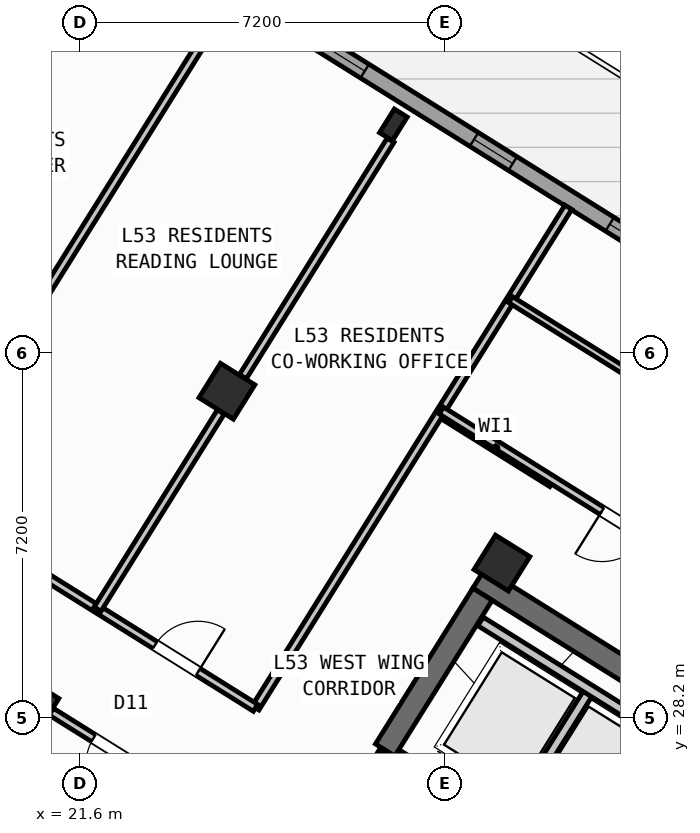
"""IFC4 building model, lengths in metres.
Left out: names, types, materials, properties, quantities, classifications, styles, units other than length and angle.
Written with IfcOpenShell. Run it as: python <this file> out.ifc"""

import sys

from ifc_helpers import new_model, si_unit, direction, frame, frame_2d, origin, origin_2d, place, context, subcontext, project, spatial, rectangle, hollow_rectangle, i_section, extrude, source, transform, mapped, element, fill, save


model = new_model("IFC4")
c1 = context("Model", 3, precision=1e-05, world=origin(), true_north=direction((0.0, 1.0)))
c2 = subcontext(c1, "Body", "Model", "MODEL_VIEW")
j1 = project(units=[si_unit("LENGTHUNIT", "METRE"), si_unit("PLANEANGLEUNIT", "RADIAN")], contexts=[c1])
p1 = place(None, origin())
s1 = spatial("IfcSite", under=j1, at=p1, CompositionType="ELEMENT")
p2 = place(p1, origin())
s2 = spatial("IfcBuilding", under=s1, at=p2, CompositionType="ELEMENT")
p3 = place(p2, frame((0.0, 0.0, 211.2)))
s3 = spatial("IfcBuildingStorey", under=s2, at=p3, CompositionType="ELEMENT", Elevation=211.2)
p4 = place(p3, frame((40.531, 24.036, 0.0), z_axis=(0.0, 0.0, 1.0), x_axis=(-0.848048787466, 0.529918157905, 0.0)))
e1 = element("IfcWall", 1, at=p4, inside=s3, PredefinedType="SHEAR", context=c2, shape_type="SweptSolid", body=[
    extrude(rectangle(XDim=13.04, YDim=0.45, at=frame_2d((6.52, 0.0))), origin(), (0.0, 0.0, 1.0), 3.35),
])
p5 = place(p3, frame((29.544, 30.636, 0.0), z_axis=(0.0, 0.0, 1.0), x_axis=(-0.529902075036, -0.848058836916, 0.0)))
e2 = element("IfcWall", 2, at=p5, inside=s3, PredefinedType="SHEAR", context=c2, shape_type="SweptSolid", body=[
    extrude(rectangle(XDim=3.625, YDim=0.45, at=frame_2d((1.812, 0.0))), origin(), (0.0, 0.0, 1.0), 3.35),
])
m1 = source(origin(), c2, "Body", "SweptSolid", [
    extrude(hollow_rectangle(XDim=0.8, YDim=0.8, WallThickness=0.032, at=origin_2d()), origin(), (0.0, 0.0, 1.0), 3.6),
])
p6 = place(p3, frame((29.928, 31.251, 0.0), z_axis=(0.0, 0.0, 1.0), x_axis=(-0.848048096156, 0.529919264233, 0.0)))
e3 = element("IfcColumn", 3, at=p6, inside=s3, PredefinedType="COLUMN", context=c2, shape_type="MappedRepresentation", body=[
    mapped(m1, transform((0.0, 0.0, 0.0), scale=1.0)),
])
m2 = source(origin(), c2, "Body", "SweptSolid", [
    extrude(i_section(OverallWidth=0.3, OverallDepth=0.55, WebThickness=0.015, FlangeThickness=0.029, at=origin_2d()), origin(), (0.0, 0.0, 1.0), 3.6),
])
p7 = place(p3, frame((27.786, 39.901, 0.0), z_axis=(0.0, 0.0, 1.0), x_axis=(-0.848048096156, 0.529919264233, 0.0)))
e4 = element("IfcColumn", 4, at=p7, inside=s3, PredefinedType="COLUMN", context=c2, shape_type="MappedRepresentation", body=[
    mapped(m2, transform((0.0, 0.0, 0.0), scale=1.0)),
])
for number, where, z_axis, x_axis in (
    (5, (24.5, 34.643, 0.0), (0.0, 0.0, 1.0), (-0.848, 0.53, 0.0)),
    (6, (20.632, 28.452, 0.0), (0.0, 0.0, 1.0), (-0.848, 0.53, 0.0)),
):
    element("IfcColumn", number, at=place(p3, frame(where, z_axis=z_axis, x_axis=x_axis)), inside=s3, PredefinedType="COLUMN", context=c2, shape_type="MappedRepresentation", body=[
        mapped(m1, transform((0.0, 0.0, 0.0), scale=1.0)),
    ])
p8 = place(p3, frame((31.76, 12.183, 0.0), z_axis=(0.0, 0.0, 1.0), x_axis=(-0.848047074256, 0.529920899612, 0.0)))
e7 = element("IfcWall", 7, at=p8, inside=s3, PredefinedType="STANDARD", context=c2, shape_type="SweptSolid", body=[
    extrude(rectangle(XDim=30.652, YDim=0.32, at=frame_2d((15.326, 0.0))), origin(), (0.0, 0.0, 1.0), 3.35),
])
p9 = place(p8, frame((15.166, 0.0, 0.0)))
e8 = element("IfcOpeningElement", 8, at=p9, cuts=e7, PredefinedType="OPENING", context=c2, shape_type="SweptSolid", body=[
    extrude(rectangle(XDim=1.2, YDim=2.15, at=frame_2d((0.6, 1.075))), frame((0.0, 0.17, 0.0), z_axis=(0.0, -1.0, 0.0), x_axis=(1.0, 0.0, 0.0)), (0.0, 0.0, 1.0), 0.34),
])
p10 = place(p8, frame((2.24, 0.0, 0.9)))
e9 = element("IfcOpeningElement", 9, at=p10, cuts=e7, PredefinedType="OPENING", context=c2, shape_type="SweptSolid", body=[
    extrude(rectangle(XDim=1.65, YDim=1.45, at=frame_2d((0.825, 0.725))), frame((0.0, 0.17, 0.0), z_axis=(0.0, -1.0, 0.0), x_axis=(1.0, 0.0, 0.0)), (0.0, 0.0, 1.0), 0.34),
])
p11 = place(p8, frame((7.469, 0.0, 0.9)))
e10 = element("IfcOpeningElement", 10, at=p11, cuts=e7, PredefinedType="OPENING", context=c2, shape_type="SweptSolid", body=[
    extrude(rectangle(XDim=1.65, YDim=1.45, at=frame_2d((0.825, 0.725))), frame((0.0, 0.17, 0.0), z_axis=(0.0, -1.0, 0.0), x_axis=(1.0, 0.0, 0.0)), (0.0, 0.0, 1.0), 0.34),
])
p12 = place(p8, frame((12.623, 0.0, 1.0)))
e11 = element("IfcOpeningElement", 11, at=p12, cuts=e7, PredefinedType="OPENING", context=c2, shape_type="SweptSolid", body=[
    extrude(rectangle(XDim=0.9, YDim=1.25, at=frame_2d((0.45, 0.625))), frame((0.0, 0.17, 0.0), z_axis=(0.0, -1.0, 0.0), x_axis=(1.0, 0.0, 0.0)), (0.0, 0.0, 1.0), 0.34),
])
p13 = place(p8, frame((19.715, 0.0, 1.0)))
e12 = element("IfcOpeningElement", 12, at=p13, cuts=e7, PredefinedType="OPENING", context=c2, shape_type="SweptSolid", body=[
    extrude(rectangle(XDim=0.9, YDim=1.25, at=frame_2d((0.45, 0.625))), frame((0.0, 0.17, 0.0), z_axis=(0.0, -1.0, 0.0), x_axis=(1.0, 0.0, 0.0)), (0.0, 0.0, 1.0), 0.34),
])
p14 = place(p8, frame((25.566, 0.0, 0.9)))
e13 = element("IfcOpeningElement", 13, at=p14, cuts=e7, PredefinedType="OPENING", context=c2, shape_type="SweptSolid", body=[
    extrude(rectangle(XDim=1.65, YDim=1.45, at=frame_2d((0.825, 0.725))), frame((0.0, 0.17, 0.0), z_axis=(0.0, -1.0, 0.0), x_axis=(1.0, 0.0, 0.0)), (0.0, 0.0, 1.0), 0.34),
])
p15 = place(p8, frame((28.896, 0.0, 1.0)))
e14 = element("IfcOpeningElement", 14, at=p15, cuts=e7, PredefinedType="OPENING", context=c2, shape_type="SweptSolid", body=[
    extrude(rectangle(XDim=0.9, YDim=1.25, at=frame_2d((0.45, 0.625))), frame((0.0, 0.17, 0.0), z_axis=(0.0, -1.0, 0.0), x_axis=(1.0, 0.0, 0.0)), (0.0, 0.0, 1.0), 0.34),
])
p16 = place(p3, frame((17.424, 47.083, 0.0), z_axis=(0.0, 0.0, 1.0), x_axis=(0.848049927979, -0.529916332693, 0.0)))
e15 = element("IfcWall", 15, at=p16, inside=s3, PredefinedType="STANDARD", context=c2, shape_type="SweptSolid", body=[
    extrude(rectangle(XDim=29.223, YDim=0.32, at=frame_2d((14.612, 0.0))), origin(), (0.0, 0.0, 1.0), 3.35),
])
p17 = place(p16, frame((2.526, 0.0, 0.0)))
e16 = element("IfcOpeningElement", 16, at=p17, cuts=e15, PredefinedType="OPENING", context=c2, shape_type="SweptSolid", body=[
    extrude(rectangle(XDim=1.05, YDim=2.15, at=frame_2d((0.525, 1.075))), frame((0.0, 0.17, 0.0), z_axis=(0.0, -1.0, 0.0), x_axis=(1.0, 0.0, 0.0)), (0.0, 0.0, 1.0), 0.34),
])
p18 = place(p16, frame((0.653, 0.0, 0.9)))
e17 = element("IfcOpeningElement", 17, at=p18, cuts=e15, PredefinedType="OPENING", context=c2, shape_type="SweptSolid", body=[
    extrude(rectangle(XDim=1.35, YDim=1.45, at=frame_2d((0.675, 0.725))), frame((0.0, 0.17, 0.0), z_axis=(0.0, -1.0, 0.0), x_axis=(1.0, 0.0, 0.0)), (0.0, 0.0, 1.0), 0.34),
])
p19 = place(p16, frame((6.897, 0.0, 1.0)))
e18 = element("IfcOpeningElement", 18, at=p19, cuts=e15, PredefinedType="OPENING", context=c2, shape_type="SweptSolid", body=[
    extrude(rectangle(XDim=0.9, YDim=1.25, at=frame_2d((0.45, 0.625))), frame((0.0, 0.17, 0.0), z_axis=(0.0, -1.0, 0.0), x_axis=(1.0, 0.0, 0.0)), (0.0, 0.0, 1.0), 0.34),
])
p20 = place(p16, frame((9.602, 0.0, 0.95)))
e19 = element("IfcOpeningElement", 19, at=p20, cuts=e15, PredefinedType="OPENING", context=c2, shape_type="SweptSolid", body=[
    extrude(rectangle(XDim=1.95, YDim=1.35, at=frame_2d((0.975, 0.675))), frame((0.0, 0.17, 0.0), z_axis=(0.0, -1.0, 0.0), x_axis=(1.0, 0.0, 0.0)), (0.0, 0.0, 1.0), 0.34),
])
p21 = place(p16, frame((14.096, 0.0, 1.0)))
e20 = element("IfcOpeningElement", 20, at=p21, cuts=e15, PredefinedType="OPENING", context=c2, shape_type="SweptSolid", body=[
    extrude(rectangle(XDim=0.9, YDim=1.25, at=frame_2d((0.45, 0.625))), frame((0.0, 0.17, 0.0), z_axis=(0.0, -1.0, 0.0), x_axis=(1.0, 0.0, 0.0)), (0.0, 0.0, 1.0), 0.34),
])
p22 = place(p16, frame((17.254, 0.0, 1.0)))
e21 = element("IfcOpeningElement", 21, at=p22, cuts=e15, PredefinedType="OPENING", context=c2, shape_type="SweptSolid", body=[
    extrude(rectangle(XDim=0.9, YDim=1.25, at=frame_2d((0.45, 0.625))), frame((0.0, 0.17, 0.0), z_axis=(0.0, -1.0, 0.0), x_axis=(1.0, 0.0, 0.0)), (0.0, 0.0, 1.0), 0.34),
])
p23 = place(p16, frame((21.139, 0.0, 0.9)))
e22 = element("IfcOpeningElement", 22, at=p23, cuts=e15, PredefinedType="OPENING", context=c2, shape_type="SweptSolid", body=[
    extrude(rectangle(XDim=1.35, YDim=1.45, at=frame_2d((0.675, 0.725))), frame((0.0, 0.17, 0.0), z_axis=(0.0, -1.0, 0.0), x_axis=(1.0, 0.0, 0.0)), (0.0, 0.0, 1.0), 0.34),
])
p24 = place(p16, frame((25.778, 0.0, 0.9)))
e23 = element("IfcOpeningElement", 23, at=p24, cuts=e15, PredefinedType="OPENING", context=c2, shape_type="SweptSolid", body=[
    extrude(rectangle(XDim=1.35, YDim=1.45, at=frame_2d((0.675, 0.725))), frame((0.0, 0.17, 0.0), z_axis=(0.0, -1.0, 0.0), x_axis=(1.0, 0.0, 0.0)), (0.0, 0.0, 1.0), 0.34),
])
p25 = place(p3, frame((33.496, 27.677, 0.0), z_axis=(0.0, 0.0, 1.0), x_axis=(-0.529908658664, -0.84805472316, 0.0)))
e24 = element("IfcWall", 24, at=p25, inside=s3, PredefinedType="SHEAR", context=c2, shape_type="SweptSolid", body=[
    extrude(rectangle(XDim=3.16, YDim=0.26, at=frame_2d((1.58, 0.0))), origin(), (0.0, 0.0, 1.0), 3.35),
])
p26 = place(p3, frame((31.822, 24.998, 0.0), z_axis=(0.0, 0.0, 1.0), x_axis=(-0.848054125777, 0.529909614701, 0.0)))
e25 = element("IfcWall", 25, at=p26, inside=s3, PredefinedType="STANDARD", context=c2, shape_type="SweptSolid", body=[
    extrude(rectangle(XDim=4.668, YDim=0.2, at=frame_2d((2.334, 0.0))), origin(), (0.0, 0.0, 1.0), 3.34),
])
p27 = place(p26, frame((0.52, 0.0, 0.0)))
e26 = element("IfcOpeningElement", 26, at=p27, cuts=e25, PredefinedType="OPENING", context=c2, shape_type="SweptSolid", body=[
    extrude(rectangle(XDim=1.2, YDim=2.15, at=frame_2d((0.6, 1.075))), frame((0.0, 0.11, 0.0), z_axis=(0.0, -1.0, 0.0), x_axis=(1.0, 0.0, 0.0)), (0.0, 0.0, 1.0), 0.22),
])
p28 = place(p26, frame((2.54, 0.0, 0.0)))
e27 = element("IfcOpeningElement", 27, at=p28, cuts=e25, PredefinedType="OPENING", context=c2, shape_type="SweptSolid", body=[
    extrude(rectangle(XDim=1.2, YDim=2.15, at=frame_2d((0.6, 1.075))), frame((0.0, 0.11, 0.0), z_axis=(0.0, -1.0, 0.0), x_axis=(1.0, 0.0, 0.0)), (0.0, 0.0, 1.0), 0.22),
])
p29 = place(p3, frame((31.645, 28.716, 0.0), z_axis=(0.0, 0.0, 1.0), x_axis=(-0.52986693015, -0.848080795876, 0.0)))
e28 = element("IfcWall", 28, at=p29, inside=s3, PredefinedType="STANDARD", context=c2, shape_type="SweptSolid", body=[
    extrude(rectangle(XDim=2.66, YDim=0.2, at=frame_2d((1.33, 0.0))), origin(), (0.0, 0.0, 1.0), 3.34),
])
p30 = place(p3, frame((33.363, 27.69, 0.0), z_axis=(0.0, 0.0, 1.0), x_axis=(-0.84804957148, 0.529916903215, 0.0)))
e29 = element("IfcWall", 29, at=p30, inside=s3, PredefinedType="STANDARD", context=c2, shape_type="SweptSolid", body=[
    extrude(rectangle(XDim=4.548, YDim=0.2, at=frame_2d((2.274, 0.0))), origin(), (0.0, 0.0, 1.0), 3.34),
])
p31 = place(p3, frame((27.596, 27.52, 0.0), z_axis=(0.0, 0.0, 1.0), x_axis=(-0.529865479138, -0.848081702443, 0.0)))
e30 = element("IfcWall", 30, at=p31, inside=s3, PredefinedType="STANDARD", context=c2, shape_type="SweptSolid", body=[
    extrude(rectangle(XDim=2.96, YDim=0.2, at=frame_2d((1.48, 0.0))), origin(), (0.0, 0.0, 1.0), 3.34),
])
p32 = place(p31, frame((0.7, 0.0, 0.0)))
e31 = element("IfcOpeningElement", 31, at=p32, cuts=e30, PredefinedType="OPENING", context=c2, shape_type="SweptSolid", body=[
    extrude(rectangle(XDim=1.5, YDim=2.15, at=frame_2d((0.75, 1.075))), frame((0.0, 0.11, 0.0), z_axis=(0.0, -1.0, 0.0), x_axis=(1.0, 0.0, 0.0)), (0.0, 0.0, 1.0), 0.22),
])
p33 = place(p3, frame((30.914, 32.829, 0.0), z_axis=(0.0, 0.0, 1.0), x_axis=(-0.848008813643, 0.529982124211, 0.0)))
e32 = element("IfcWall", 32, at=p33, inside=s3, PredefinedType="PARTITIONING", context=c2, shape_type="SweptSolid", body=[
    extrude(rectangle(XDim=2.61, YDim=0.16, at=frame_2d((1.305, 0.0))), origin(), (0.0, 0.0, 1.0), 3.34),
])
p34 = place(p3, frame((31.239, 38.274, 0.0), z_axis=(0.0, 0.0, 1.0), x_axis=(-0.529925472745, -0.848044216616, 0.0)))
e33 = element("IfcWall", 33, at=p34, inside=s3, PredefinedType="PARTITIONING", context=c2, shape_type="SweptSolid", body=[
    extrude(rectangle(XDim=11.65, YDim=0.16, at=frame_2d((5.825, 0.0))), origin(), (0.0, 0.0, 1.0), 3.34),
])
p35 = place(p3, frame((25.065, 28.394, 0.0), z_axis=(0.0, 0.0, 1.0), x_axis=(-0.848048310262, 0.529918921593, 0.0)))
e34 = element("IfcWall", 34, at=p35, inside=s3, PredefinedType="PARTITIONING", context=c2, shape_type="SweptSolid", body=[
    extrude(rectangle(XDim=16.73, YDim=0.16, at=frame_2d((8.365, 0.0))), origin(), (0.0, 0.0, 1.0), 3.34),
])
p36 = place(p35, frame((1.338, 0.0, 0.0)))
e35 = element("IfcOpeningElement", 35, at=p36, cuts=e34, PredefinedType="OPENING", context=c2, shape_type="SweptSolid", body=[
    extrude(rectangle(XDim=1.0, YDim=2.1, at=frame_2d((0.5, 1.05))), frame((0.0, 0.09, 0.0), z_axis=(0.0, -1.0, 0.0), x_axis=(1.0, 0.0, 0.0)), (0.0, 0.0, 1.0), 0.18),
])
p37 = place(p35, frame((5.265, 0.0, 0.0)))
e36 = element("IfcOpeningElement", 36, at=p37, cuts=e34, PredefinedType="OPENING", context=c2, shape_type="SweptSolid", body=[
    extrude(rectangle(XDim=1.0, YDim=2.1, at=frame_2d((0.5, 1.05))), frame((0.0, 0.09, 0.0), z_axis=(0.0, -1.0, 0.0), x_axis=(1.0, 0.0, 0.0)), (0.0, 0.0, 1.0), 0.18),
])
p38 = place(p35, frame((9.526, 0.0, 0.0)))
e37 = element("IfcOpeningElement", 37, at=p38, cuts=e34, PredefinedType="OPENING", context=c2, shape_type="SweptSolid", body=[
    extrude(rectangle(XDim=1.0, YDim=2.1, at=frame_2d((0.5, 1.05))), frame((0.0, 0.09, 0.0), z_axis=(0.0, -1.0, 0.0), x_axis=(1.0, 0.0, 0.0)), (0.0, 0.0, 1.0), 0.18),
])
p39 = place(p35, frame((13.954, 0.0, 0.0)))
e38 = element("IfcOpeningElement", 38, at=p39, cuts=e34, PredefinedType="OPENING", context=c2, shape_type="SweptSolid", body=[
    extrude(rectangle(XDim=1.0, YDim=2.1, at=frame_2d((0.5, 1.05))), frame((0.0, 0.09, 0.0), z_axis=(0.0, -1.0, 0.0), x_axis=(1.0, 0.0, 0.0)), (0.0, 0.0, 1.0), 0.18),
])
p40 = place(p3, frame((23.899, 26.529, 0.0), z_axis=(0.0, 0.0, 1.0), x_axis=(-0.848055143312, 0.529907986259, 0.0)))
e39 = element("IfcWall", 39, at=p40, inside=s3, PredefinedType="PARTITIONING", context=c2, shape_type="SweptSolid", body=[
    extrude(rectangle(XDim=3.378, YDim=0.16, at=frame_2d((1.689, 0.0))), origin(), (0.0, 0.0, 1.0), 2.825),
])
p41 = place(p40, frame((1.395, 0.0, 0.0)))
e40 = element("IfcOpeningElement", 40, at=p41, cuts=e39, PredefinedType="OPENING", context=c2, shape_type="SweptSolid", body=[
    extrude(rectangle(XDim=1.0, YDim=2.1, at=frame_2d((0.5, 1.05))), frame((0.0, 0.09, 0.0), z_axis=(0.0, -1.0, 0.0), x_axis=(1.0, 0.0, 0.0)), (0.0, 0.0, 1.0), 0.18),
])
p42 = place(p3, frame((27.73, 39.597, 0.0), z_axis=(0.0, 0.0, 1.0), x_axis=(-0.529919150083, -0.848048167486, 0.0)))
e41 = element("IfcWall", 41, at=p42, inside=s3, PredefinedType="PARTITIONING", context=c2, shape_type="SweptSolid", body=[
    extrude(rectangle(XDim=5.501, YDim=0.16, at=frame_2d((2.75, 0.0))), origin(), (0.0, 0.0, 1.0), 2.825),
])
p43 = place(p3, frame((24.379, 34.233, 0.0), z_axis=(0.0, 0.0, 1.0), x_axis=(-0.529922402838, -0.84804613493, 0.0)))
e42 = element("IfcWall", 42, at=p43, inside=s3, PredefinedType="PARTITIONING", context=c2, shape_type="SweptSolid", body=[
    extrude(rectangle(XDim=4.588, YDim=0.16, at=frame_2d((2.294, 0.0))), origin(), (0.0, 0.0, 1.0), 2.825),
])
p44 = place(p3, frame((24.578, 42.436, 0.0), z_axis=(0.0, 0.0, 1.0), x_axis=(-0.529916055051, -0.848050101468, 0.0)))
e43 = element("IfcWall", 43, at=p44, inside=s3, PredefinedType="PARTITIONING", context=c2, shape_type="SweptSolid", body=[
    extrude(rectangle(XDim=11.65, YDim=0.16, at=frame_2d((5.825, 0.0))), origin(), (0.0, 0.0, 1.0), 2.995),
])
p45 = place(p3, frame((41.936, 26.012, 0.0), z_axis=(0.0, 0.0, 1.0), x_axis=(-0.848051154596, 0.529914369676, 0.0)))
e44 = element("IfcWall", 44, at=p45, inside=s3, PredefinedType="PARTITIONING", context=c2, shape_type="SweptSolid", body=[
    extrude(rectangle(XDim=15.57, YDim=0.16, at=frame_2d((7.785, 0.0))), origin(), (0.0, 0.0, 1.0), 3.34),
])
p46 = place(p45, frame((10.83, 0.0, 0.0)))
e45 = element("IfcOpeningElement", 45, at=p46, cuts=e44, PredefinedType="OPENING", context=c2, shape_type="SweptSolid", body=[
    extrude(rectangle(XDim=1.0, YDim=2.1, at=frame_2d((0.5, 1.05))), frame((0.0, 0.09, 0.0), z_axis=(0.0, -1.0, 0.0), x_axis=(1.0, 0.0, 0.0)), (0.0, 0.0, 1.0), 0.18),
])
p47 = place(p3, frame((42.226, 28.873, 0.0), z_axis=(0.0, 0.0, 1.0), x_axis=(-0.848049134363, 0.529917602752, 0.0)))
e46 = element("IfcWall", 46, at=p47, inside=s3, PredefinedType="PLUMBINGWALL", context=c2, shape_type="SweptSolid", body=[
    extrude(rectangle(XDim=14.3, YDim=0.14, at=frame_2d((7.15, 0.0))), origin(), (0.0, 0.0, 1.0), 3.34),
])
p48 = place(p47, frame((9.57, 0.0, 0.0)))
e47 = element("IfcOpeningElement", 47, at=p48, cuts=e46, PredefinedType="OPENING", context=c2, shape_type="SweptSolid", body=[
    extrude(rectangle(XDim=0.92, YDim=2.08, at=frame_2d((0.46, 1.04))), frame((0.0, 0.08, 0.0), z_axis=(0.0, -1.0, 0.0), x_axis=(1.0, 0.0, 0.0)), (0.0, 0.0, 1.0), 0.16),
])
m3 = source(origin(), c2, "Body", "SweptSolid", [
    extrude(rectangle(XDim=1.95, YDim=1.35, at=frame_2d((0.975, 0.675))), frame((0.0, 0.03, 0.0), z_axis=(0.0, -1.0, 0.0), x_axis=(1.0, 0.0, 0.0)), (0.0, 0.0, 1.0), 0.06),
])
p49 = place(p20, origin())
e48 = element("IfcWindow", 48, at=p49, inside=s3, PartitioningType="SINGLE_PANEL", PredefinedType="WINDOW", context=c2, shape_type="MappedRepresentation", body=[
    mapped(m3, transform((0.0, 0.0, 0.0), scale=1.0)),
])
fill(e19, e48)
m4 = source(origin(), c2, "Body", "SweptSolid", [
    extrude(rectangle(XDim=0.9, YDim=1.25, at=frame_2d((0.45, 0.625))), frame((0.0, 0.03, 0.0), z_axis=(0.0, -1.0, 0.0), x_axis=(1.0, 0.0, 0.0)), (0.0, 0.0, 1.0), 0.06),
])
p50 = place(p21, origin())
e49 = element("IfcWindow", 49, at=p50, inside=s3, PartitioningType="SINGLE_PANEL", PredefinedType="WINDOW", context=c2, shape_type="MappedRepresentation", body=[
    mapped(m4, transform((0.0, 0.0, 0.0), scale=1.0)),
])
fill(e20, e49)
p51 = place(p22, origin())
e50 = element("IfcWindow", 50, at=p51, inside=s3, PartitioningType="SINGLE_PANEL", PredefinedType="WINDOW", context=c2, shape_type="MappedRepresentation", body=[
    mapped(m4, transform((0.0, 0.0, 0.0), scale=1.0)),
])
fill(e21, e50)
m5 = source(origin(), c2, "Body", "SweptSolid", [
    extrude(rectangle(XDim=1.0, YDim=2.1, at=frame_2d((0.5, 1.05))), frame((0.0, 0.025, 0.0), z_axis=(0.0, -1.0, 0.0), x_axis=(1.0, 0.0, 0.0)), (0.0, 0.0, 1.0), 0.05),
])
p52 = place(p41, origin())
e51 = element("IfcDoor", 51, at=p52, inside=s3, OperationType="SINGLE_SWING_LEFT", PredefinedType="DOOR", context=c2, shape_type="MappedRepresentation", body=[
    mapped(m5, transform((0.0, 0.0, 0.0), scale=1.0)),
])
fill(e40, e51)
p53 = place(p36, frame((1.0, 0.0, 0.0), z_axis=(0.0, 0.0, 1.0), x_axis=(-1.0, 0.0, 0.0)))
e52 = element("IfcDoor", 52, at=p53, inside=s3, OperationType="SINGLE_SWING_RIGHT", PredefinedType="DOOR", context=c2, shape_type="MappedRepresentation", body=[
    mapped(m5, transform((0.0, 0.0, 0.0), scale=1.0)),
])
fill(e35, e52)
p54 = place(p46, origin())
e53 = element("IfcDoor", 53, at=p54, inside=s3, OperationType="SINGLE_SWING_RIGHT", PredefinedType="DOOR", context=c2, shape_type="MappedRepresentation", body=[
    mapped(m5, transform((0.0, 0.0, 0.0), scale=1.0)),
])
fill(e45, e53)
save(model, sys.argv[1])
